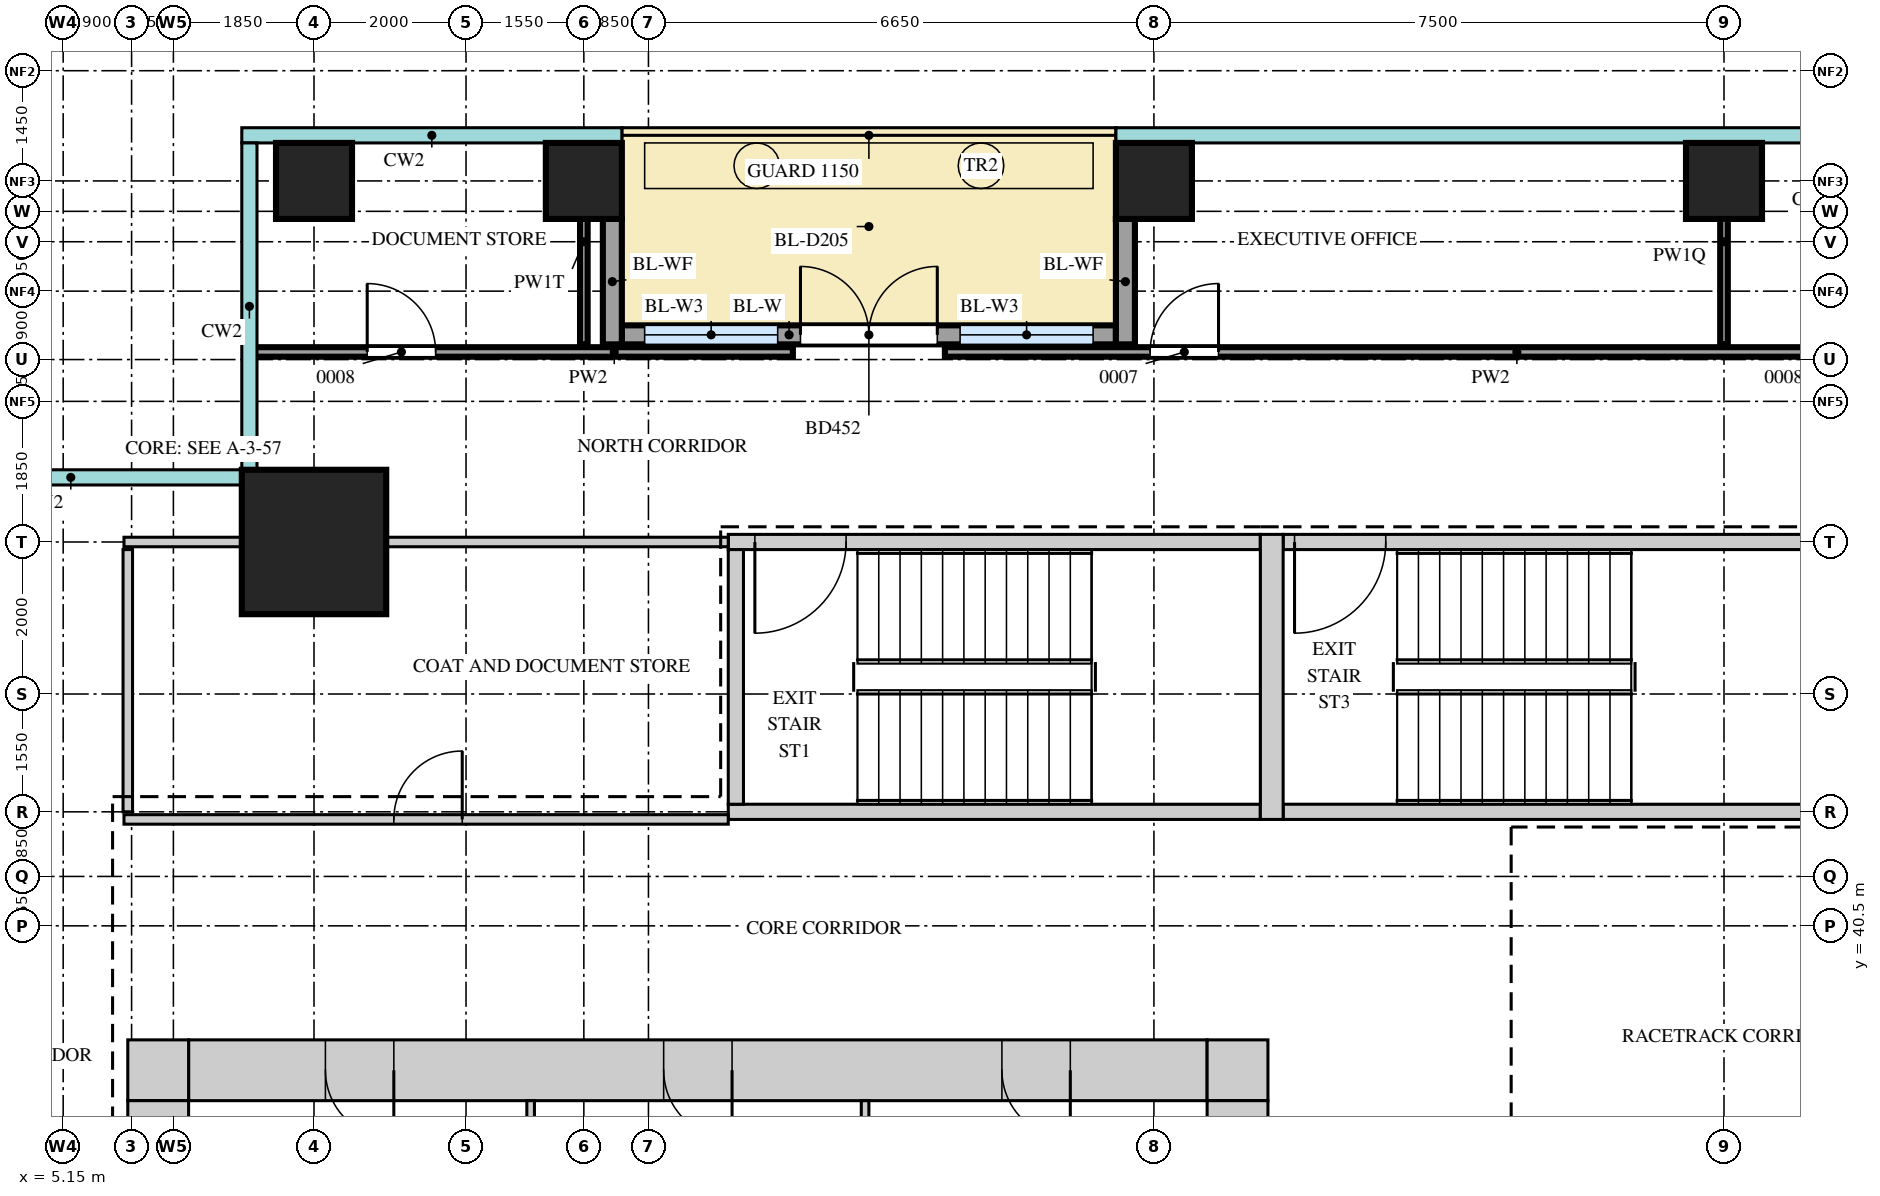
"""IFC4 building model, lengths in metres.
Left out: names, types, materials, properties, quantities, classifications, styles, units other than length and angle.
Written with IfcOpenShell. Run it as: python <this file> out.ifc"""

import sys

from ifc_helpers import new_model, si_unit, direction, frame, frame_2d, origin, origin_2d, place, context, subcontext, project, spatial, rectangle, extrude, source, transform, mapped, element, fill, save


model = new_model("IFC4")
c1 = context("Model", 3, precision=1e-05, world=origin(), true_north=direction((0.0, 1.0)))
c2 = subcontext(c1, "Body", "Model", "MODEL_VIEW")
j1 = project(units=[si_unit("LENGTHUNIT", "METRE"), si_unit("PLANEANGLEUNIT", "RADIAN")], contexts=[c1])
p1 = place(None, origin())
s1 = spatial("IfcSite", under=j1, at=p1, CompositionType="ELEMENT")
p2 = place(p1, origin())
s2 = spatial("IfcBuilding", under=s1, at=p2, CompositionType="ELEMENT")
p3 = place(p2, frame((0.0, 0.0, 204.7)))
s3 = spatial("IfcBuildingStorey", under=s2, at=p3, CompositionType="ELEMENT", Elevation=204.7)
m1 = source(origin(), c2, "Body", "SweptSolid", [
    extrude(rectangle(XDim=13.4, YDim=0.8, at=frame_2d((6.7, 0.0))), origin(), (0.0, 0.0, 1.0), 3.75),
])
p4 = place(p3, frame((6.8, 38.6, 0.0), z_axis=(0.0, 0.0, 1.0), x_axis=(1.0, 0.0, 0.0)))
e1 = element("IfcWall", 1, at=p4, inside=s3, PredefinedType="SHEAR", context=c2, shape_type="MappedRepresentation", body=[
    mapped(m1, transform((0.0, 0.0, 0.0))),
])
m2 = source(origin(), c2, "Body", "SweptSolid", [
    extrude(rectangle(XDim=0.9, YDim=2.1, at=frame_2d((0.45, 1.05))), frame((0.0, 0.41, 0.0), z_axis=(0.0, -1.0, 0.0), x_axis=(1.0, 0.0, 0.0)), (0.0, 0.0, 1.0), 0.82),
])
p5 = place(p4, frame((1.8, 0.0, 0.0)))
e2 = element("IfcOpeningElement", 2, at=p5, cuts=e1, PredefinedType="OPENING", context=c2, shape_type="MappedRepresentation", body=[
    mapped(m2, transform((0.0, 0.0, 0.0))),
])
p6 = place(p4, frame((6.25, 0.0, 0.0)))
e3 = element("IfcOpeningElement", 3, at=p6, cuts=e1, PredefinedType="OPENING", context=c2, shape_type="MappedRepresentation", body=[
    mapped(m2, transform((0.0, 0.0, 0.0))),
])
p7 = place(p4, frame((10.7, 0.0, 0.0)))
e4 = element("IfcOpeningElement", 4, at=p7, cuts=e1, PredefinedType="OPENING", context=c2, shape_type="MappedRepresentation", body=[
    mapped(m2, transform((0.0, 0.0, 0.0))),
])
m3 = source(origin(), c2, "Body", "SweptSolid", [
    extrude(rectangle(XDim=0.8, YDim=0.8, at=frame_2d((0.4, 0.0))), origin(), (0.0, 0.0, 1.0), 3.75),
])
for number, where, z_axis, x_axis in (
    (5, (20.2, 38.6, 0.0), (0.0, 0.0, 1.0), (1.0, 0.0, 0.0)),
    (6, (6.0, 38.6, 0.0), (0.0, 0.0, 1.0), (1.0, 0.0, 0.0)),
):
    element("IfcWall", number, at=place(p3, frame(where, z_axis=z_axis, x_axis=x_axis)), inside=s3, PredefinedType="SHEAR", context=c2, shape_type="MappedRepresentation", body=[
        mapped(m3, transform((0.0, 0.0, 0.0))),
    ])
m4 = source(origin(), c2, "Body", "SweptSolid", [
    extrude(rectangle(XDim=22.4, YDim=0.8, at=frame_2d((11.2, 0.0))), origin(), (0.0, 0.0, 1.0), 3.75),
])
p8 = place(p3, frame((20.6, 15.8, 0.0), z_axis=(0.0, 0.0, 1.0), x_axis=(0.0, 1.0, 0.0)))
e7 = element("IfcWall", 7, at=p8, inside=s3, PredefinedType="SHEAR", context=c2, shape_type="MappedRepresentation", body=[
    mapped(m4, transform((0.0, 0.0, 0.0))),
])
m5 = source(origin(), c2, "Body", "SweptSolid", [
    extrude(rectangle(XDim=1.8, YDim=2.1, at=frame_2d((0.9, 1.05))), frame((0.0, 0.41, 0.0), z_axis=(0.0, -1.0, 0.0), x_axis=(1.0, 0.0, 0.0)), (0.0, 0.0, 1.0), 0.82),
])
p9 = place(p8, frame((10.7, 0.0, 0.0)))
e8 = element("IfcOpeningElement", 8, at=p9, cuts=e7, PredefinedType="OPENING", context=c2, shape_type="MappedRepresentation", body=[
    mapped(m5, transform((0.0, 0.0, 0.0))),
])
p10 = place(p8, frame((0.35, 0.0, 0.0)))
e9 = element("IfcOpeningElement", 9, at=p10, cuts=e7, PredefinedType="OPENING", context=c2, shape_type="MappedRepresentation", body=[
    mapped(m2, transform((0.0, 0.0, 0.0))),
])
p11 = place(p8, frame((2.8, 0.0, 0.0)))
e10 = element("IfcOpeningElement", 10, at=p11, cuts=e7, PredefinedType="OPENING", context=c2, shape_type="MappedRepresentation", body=[
    mapped(m2, transform((0.0, 0.0, 0.0))),
])
m6 = source(origin(), c2, "Body", "SweptSolid", [
    extrude(rectangle(XDim=1.0, YDim=2.1, at=frame_2d((0.5, 1.05))), frame((0.0, 0.41, 0.0), z_axis=(0.0, -1.0, 0.0), x_axis=(1.0, 0.0, 0.0)), (0.0, 0.0, 1.0), 0.82),
])
p12 = place(p8, frame((5.5, 0.0, 0.0)))
e11 = element("IfcOpeningElement", 11, at=p12, cuts=e7, PredefinedType="OPENING", context=c2, shape_type="MappedRepresentation", body=[
    mapped(m6, transform((0.0, 0.0, 0.0))),
])
p13 = place(p3, frame((6.4, 15.8, 0.0), z_axis=(0.0, 0.0, 1.0), x_axis=(0.0, 1.0, 0.0)))
e12 = element("IfcWall", 12, at=p13, inside=s3, PredefinedType="SHEAR", context=c2, shape_type="MappedRepresentation", body=[
    mapped(m4, transform((0.0, 0.0, 0.0))),
])
m7 = source(origin(), c2, "Body", "SweptSolid", [
    extrude(rectangle(XDim=7.0, YDim=0.2, at=frame_2d((3.5, 0.0))), origin(), (0.0, 0.0, 1.0), 3.75),
])
p14 = place(p3, frame((13.9, 45.55, 0.0), z_axis=(0.0, 0.0, 1.0), x_axis=(1.0, 0.0, 0.0)))
e13 = element("IfcWall", 13, at=p14, inside=s3, PredefinedType="SHEAR", context=c2, shape_type="MappedRepresentation", body=[
    mapped(m7, transform((0.0, 0.0, 0.0))),
])
m8 = source(origin(), c2, "Body", "SweptSolid", [
    extrude(rectangle(XDim=1.2, YDim=2.1, at=frame_2d((0.6, 1.05))), frame((0.0, 0.11, 0.0), z_axis=(0.0, -1.0, 0.0), x_axis=(1.0, 0.0, 0.0)), (0.0, 0.0, 1.0), 0.22),
])
p15 = place(p14, frame((0.35, 0.0, 0.0)))
e14 = element("IfcOpeningElement", 14, at=p15, cuts=e13, PredefinedType="OPENING", context=c2, shape_type="MappedRepresentation", body=[
    mapped(m8, transform((0.0, 0.0, 0.0))),
])
p16 = place(p3, frame((13.9, 42.0, 0.0), z_axis=(0.0, 0.0, 1.0), x_axis=(1.0, 0.0, 0.0)))
e15 = element("IfcWall", 15, at=p16, inside=s3, PredefinedType="SHEAR", context=c2, shape_type="MappedRepresentation", body=[
    mapped(m7, transform((0.0, 0.0, 0.0))),
])
m9 = source(origin(), c2, "Body", "SweptSolid", [
    extrude(rectangle(XDim=7.1, YDim=0.2, at=frame_2d((3.55, 0.0))), origin(), (0.0, 0.0, 1.0), 3.75),
])
p17 = place(p3, frame((21.2, 45.55, 0.0), z_axis=(0.0, 0.0, 1.0), x_axis=(1.0, 0.0, 0.0)))
e16 = element("IfcWall", 16, at=p17, inside=s3, PredefinedType="SHEAR", context=c2, shape_type="MappedRepresentation", body=[
    mapped(m9, transform((0.0, 0.0, 0.0))),
])
p18 = place(p17, frame((0.15, 0.0, 0.0)))
e17 = element("IfcOpeningElement", 17, at=p18, cuts=e16, PredefinedType="OPENING", context=c2, shape_type="MappedRepresentation", body=[
    mapped(m8, transform((0.0, 0.0, 0.0))),
])
p19 = place(p3, frame((21.2, 42.0, 0.0), z_axis=(0.0, 0.0, 1.0), x_axis=(1.0, 0.0, 0.0)))
e18 = element("IfcWall", 18, at=p19, inside=s3, PredefinedType="SHEAR", context=c2, shape_type="MappedRepresentation", body=[
    mapped(m9, transform((0.0, 0.0, 0.0))),
])
m10 = source(origin(), c2, "Body", "SweptSolid", [
    extrude(rectangle(XDim=3.75, YDim=0.3, at=frame_2d((1.875, 0.0))), origin(), (0.0, 0.0, 1.0), 3.75),
])
p20 = place(p3, frame((21.05, 41.9, 0.0), z_axis=(0.0, 0.0, 1.0), x_axis=(0.0, 1.0, 0.0)))
e19 = element("IfcWall", 19, at=p20, inside=s3, PredefinedType="SHEAR", context=c2, shape_type="MappedRepresentation", body=[
    mapped(m10, transform((0.0, 0.0, 0.0))),
])
m11 = source(origin(), c2, "Body", "SweptSolid", [
    extrude(rectangle(XDim=3.35, YDim=0.2, at=frame_2d((1.675, 0.0))), origin(), (0.0, 0.0, 1.0), 3.75),
])
p21 = place(p3, frame((14.0, 42.1, 0.0), z_axis=(0.0, 0.0, 1.0), x_axis=(0.0, 1.0, 0.0)))
e20 = element("IfcWall", 20, at=p21, inside=s3, PredefinedType="SHEAR", context=c2, shape_type="MappedRepresentation", body=[
    mapped(m11, transform((0.0, 0.0, 0.0))),
])
m12 = source(origin(), c2, "Body", "SweptSolid", [
    extrude(rectangle(XDim=1.9, YDim=1.9, at=origin_2d()), origin(), (0.0, 0.0, 1.0), 4.0),
])
p22 = place(p3, frame((8.45, 45.55, 0.0), z_axis=(0.0, 0.0, 1.0), x_axis=(1.0, 0.0, 0.0)))
e21 = element("IfcColumn", 21, at=p22, inside=s3, PredefinedType="COLUMN", context=c2, shape_type="MappedRepresentation", body=[
    mapped(m12, transform((0.0, 0.0, 0.0))),
])
m13 = source(origin(), c2, "Body", "SweptSolid", [
    extrude(rectangle(XDim=1.0, YDim=1.0, at=origin_2d()), origin(), (0.0, 0.0, 1.0), 3.75),
])
for number, where, z_axis, x_axis in (
    (22, (8.45, 50.3, 0.0), (0.0, 0.0, 1.0), (1.0, 0.0, 0.0)),
    (23, (12.0, 50.3, 0.0), (0.0, 0.0, 1.0), (1.0, 0.0, 0.0)),
    (24, (19.5, 50.3, 0.0), (0.0, 0.0, 1.0), (1.0, 0.0, 0.0)),
    (25, (27.0, 50.3, 0.0), (0.0, 0.0, 1.0), (1.0, 0.0, 0.0)),
):
    element("IfcColumn", number, at=place(p3, frame(where, z_axis=z_axis, x_axis=x_axis)), inside=s3, PredefinedType="COLUMN", context=c2, shape_type="MappedRepresentation", body=[
        mapped(m13, transform((0.0, 0.0, 0.0))),
    ])
m14 = source(origin(), c2, "Body", "SweptSolid", [
    extrude(rectangle(XDim=6.5, YDim=0.25, at=frame_2d((3.25, 0.0))), origin(), (0.0, 0.0, 1.0), 3.75),
])
p23 = place(p3, frame((12.5, 48.275, 0.0), z_axis=(0.0, 0.0, 1.0), x_axis=(1.0, 0.0, 0.0)))
e26 = element("IfcWall", 26, at=p23, inside=s3, PredefinedType="SOLIDWALL", context=c2, shape_type="MappedRepresentation", body=[
    mapped(m14, transform((0.0, 0.0, 0.0))),
])
m15 = source(origin(), c2, "Body", "SweptSolid", [
    extrude(rectangle(XDim=1.75, YDim=2.4, at=frame_2d((0.875, 1.2))), frame((0.0, 0.135, 0.0), z_axis=(0.0, -1.0, 0.0), x_axis=(1.0, 0.0, 0.0)), (0.0, 0.0, 1.0), 0.27),
])
p24 = place(p23, frame((0.3, 0.0, 0.0)))
e27 = element("IfcOpeningElement", 27, at=p24, cuts=e26, PredefinedType="OPENING", context=c2, shape_type="MappedRepresentation", body=[
    mapped(m15, transform((0.0, 0.0, 0.0))),
])
p25 = place(p23, frame((4.45, 0.0, 0.0)))
e28 = element("IfcOpeningElement", 28, at=p25, cuts=e26, PredefinedType="OPENING", context=c2, shape_type="MappedRepresentation", body=[
    mapped(m15, transform((0.0, 0.0, 0.0))),
])
m16 = source(origin(), c2, "Body", "SweptSolid", [
    extrude(rectangle(XDim=1.8, YDim=2.4, at=frame_2d((0.9, 1.2))), frame((0.0, 0.135, 0.0), z_axis=(0.0, -1.0, 0.0), x_axis=(1.0, 0.0, 0.0)), (0.0, 0.0, 1.0), 0.27),
])
p26 = place(p23, frame((2.35, 0.0, 0.0)))
e29 = element("IfcOpeningElement", 29, at=p26, cuts=e26, PredefinedType="OPENING", context=c2, shape_type="MappedRepresentation", body=[
    mapped(m16, transform((0.0, 0.0, 0.0))),
])
m17 = source(origin(), c2, "Body", "SweptSolid", [
    extrude(rectangle(XDim=1.65, YDim=0.25, at=frame_2d((0.825, 0.0))), origin(), (0.0, 0.0, 1.0), 3.45),
])
for number, where, z_axis, x_axis in (
    (30, (12.375, 49.8, 0.0), (0.0, 0.0, 1.0), (0.0, -1.0, 0.0)),
    (31, (19.125, 49.8, 0.0), (0.0, 0.0, 1.0), (0.0, -1.0, 0.0)),
):
    element("IfcWall", number, at=place(p3, frame(where, z_axis=z_axis, x_axis=x_axis)), inside=s3, PredefinedType="SOLIDWALL", context=c2, shape_type="MappedRepresentation", body=[
        mapped(m17, transform((0.0, 0.0, 0.0))),
    ])
m18 = source(origin(), c2, "Body", "SweptSolid", [
    extrude(rectangle(XDim=6.0, YDim=0.1, at=frame_2d((3.0, 0.0))), origin(), (0.0, 0.0, 1.0), 3.8),
])
for number, where, z_axis, x_axis in (
    (32, (11.3, 32.2, 0.0), (0.0, 0.0, 1.0), (0.0, 1.0, 0.0)),
    (33, (15.7, 32.2, 0.0), (0.0, 0.0, 1.0), (0.0, 1.0, 0.0)),
):
    element("IfcWall", number, at=place(p3, frame(where, z_axis=z_axis, x_axis=x_axis)), inside=s3, PredefinedType="PARTITIONING", context=c2, shape_type="MappedRepresentation", body=[
        mapped(m18, transform((0.0, 0.0, 0.0))),
    ])
m19 = source(origin(), c2, "Body", "SweptSolid", [
    extrude(rectangle(XDim=7.95, YDim=0.125, at=frame_2d((3.975, 0.0))), origin(), (0.0, 0.0, 1.0), 3.8),
])
p27 = place(p3, frame((5.95, 41.9, 0.0), z_axis=(0.0, 0.0, 1.0), x_axis=(1.0, 0.0, 0.0)))
e34 = element("IfcWall", 34, at=p27, inside=s3, PredefinedType="PARTITIONING", context=c2, shape_type="MappedRepresentation", body=[
    mapped(m19, transform((0.0, 0.0, 0.0))),
])
m20 = source(origin(), c2, "Body", "SweptSolid", [
    extrude(rectangle(XDim=0.9, YDim=2.1, at=frame_2d((0.45, 1.05))), frame((0.0, 0.073, 0.0), z_axis=(0.0, -1.0, 0.0), x_axis=(1.0, 0.0, 0.0)), (0.0, 0.0, 1.0), 0.145),
])
p28 = place(p27, frame((3.55, 0.0, 0.0)))
e35 = element("IfcOpeningElement", 35, at=p28, cuts=e34, PredefinedType="OPENING", context=c2, shape_type="MappedRepresentation", body=[
    mapped(m20, transform((0.0, 0.0, 0.0))),
])
m21 = source(origin(), c2, "Body", "SweptSolid", [
    extrude(rectangle(XDim=3.45, YDim=0.125, at=frame_2d((1.725, 0.0))), origin(), (0.0, 0.0, 1.0), 3.8),
])
p29 = place(p3, frame((6.0, 42.0, 0.0), z_axis=(0.0, 0.0, 1.0), x_axis=(0.0, 1.0, 0.0)))
e36 = element("IfcWall", 36, at=p29, inside=s3, PredefinedType="PARTITIONING", context=c2, shape_type="MappedRepresentation", body=[
    mapped(m21, transform((0.0, 0.0, 0.0))),
])
m22 = source(origin(), c2, "Body", "SweptSolid", [
    extrude(rectangle(XDim=7.95, YDim=0.125, at=frame_2d((3.975, 0.0))), origin(), (0.0, 0.0, 1.0), 3.25),
])
p30 = place(p3, frame((5.95, 45.55, 0.0), z_axis=(0.0, 0.0, 1.0), x_axis=(1.0, 0.0, 0.0)))
e37 = element("IfcWall", 37, at=p30, inside=s3, PredefinedType="PARTITIONING", context=c2, shape_type="MappedRepresentation", body=[
    mapped(m22, transform((0.0, 0.0, 0.0))),
])
m23 = source(origin(), c2, "Body", "SweptSolid", [
    extrude(rectangle(XDim=2.7, YDim=0.1, at=frame_2d((1.35, 0.0))), origin(), (0.0, 0.0, 1.0), 3.3),
])
p31 = place(p3, frame((12.0, 48.15, 0.0), z_axis=(0.0, 0.0, 1.0), x_axis=(0.0, 1.0, 0.0)))
e38 = element("IfcWall", 38, at=p31, inside=s3, PredefinedType="PARTITIONING", context=c2, shape_type="MappedRepresentation", body=[
    mapped(m23, transform((0.0, 0.0, 0.0))),
])
m24 = source(origin(), c2, "Body", "SweptSolid", [
    extrude(rectangle(XDim=2.7, YDim=0.1, at=frame_2d((1.35, 0.0))), origin(), (0.0, 0.0, 1.0), 3.42),
])
p32 = place(p3, frame((27.0, 48.15, 0.0), z_axis=(0.0, 0.0, 1.0), x_axis=(0.0, 1.0, 0.0)))
e39 = element("IfcWall", 39, at=p32, inside=s3, PredefinedType="PARTITIONING", context=c2, shape_type="MappedRepresentation", body=[
    mapped(m24, transform((0.0, 0.0, 0.0))),
])
m25 = source(origin(), c2, "Body", "SweptSolid", [
    extrude(rectangle(XDim=7.1, YDim=0.125, at=frame_2d((3.55, 0.0))), origin(), (0.0, 0.0, 1.0), 3.8),
])
p33 = place(p3, frame((7.65, 48.05, 0.0), z_axis=(0.0, 0.0, 1.0), x_axis=(1.0, 0.0, 0.0)))
e40 = element("IfcWall", 40, at=p33, inside=s3, PredefinedType="PARTITIONING", context=c2, shape_type="MappedRepresentation", body=[
    mapped(m25, transform((0.0, 0.0, 0.0))),
])
p34 = place(p33, frame((1.5, 0.0, 0.0)))
e41 = element("IfcOpeningElement", 41, at=p34, cuts=e40, PredefinedType="OPENING", context=c2, shape_type="MappedRepresentation", body=[
    mapped(m20, transform((0.0, 0.0, 0.0))),
])
m26 = source(origin(), c2, "Body", "SweptSolid", [
    extrude(rectangle(XDim=13.9, YDim=0.125, at=frame_2d((6.95, 0.0))), origin(), (0.0, 0.0, 1.0), 3.8),
])
p35 = place(p3, frame((16.75, 48.05, 0.0), z_axis=(0.0, 0.0, 1.0), x_axis=(1.0, 0.0, 0.0)))
e42 = element("IfcWall", 42, at=p35, inside=s3, PredefinedType="PARTITIONING", context=c2, shape_type="MappedRepresentation", body=[
    mapped(m26, transform((0.0, 0.0, 0.0))),
])
p36 = place(p35, frame((2.7, 0.0, 0.0)))
e43 = element("IfcOpeningElement", 43, at=p36, cuts=e42, PredefinedType="OPENING", context=c2, shape_type="MappedRepresentation", body=[
    mapped(m20, transform((0.0, 0.0, 0.0))),
])
p37 = place(p35, frame((11.45, 0.0, 0.0)))
e44 = element("IfcOpeningElement", 44, at=p37, cuts=e42, PredefinedType="OPENING", context=c2, shape_type="MappedRepresentation", body=[
    mapped(m20, transform((0.0, 0.0, 0.0))),
])
m27 = source(origin(), c2, "Body", "SweptSolid", [
    extrude(rectangle(XDim=1.75, YDim=2.4, at=frame_2d((0.875, 1.2))), frame((0.0, 0.03, 0.0), z_axis=(0.0, -1.0, 0.0), x_axis=(1.0, 0.0, 0.0)), (0.0, 0.0, 1.0), 0.06),
])
p38 = place(p24, origin())
e45 = element("IfcWindow", 45, at=p38, inside=s3, PartitioningType="SINGLE_PANEL", PredefinedType="WINDOW", context=c2, shape_type="MappedRepresentation", body=[
    mapped(m27, transform((0.0, 0.0, 0.0))),
])
fill(e27, e45)
p39 = place(p25, origin())
e46 = element("IfcWindow", 46, at=p39, inside=s3, PartitioningType="SINGLE_PANEL", PredefinedType="WINDOW", context=c2, shape_type="MappedRepresentation", body=[
    mapped(m27, transform((0.0, 0.0, 0.0))),
])
fill(e28, e46)
m28 = source(origin(), c2, "Body", "SweptSolid", [
    extrude(rectangle(XDim=1.8, YDim=2.4, at=frame_2d((0.9, 1.2))), frame((0.0, 0.025, 0.0), z_axis=(0.0, -1.0, 0.0), x_axis=(1.0, 0.0, 0.0)), (0.0, 0.0, 1.0), 0.05),
])
p40 = place(p26, origin())
e47 = element("IfcDoor", 47, at=p40, inside=s3, OperationType="DOUBLE_DOOR_DOUBLE_SWING", PredefinedType="DOOR", context=c2, shape_type="MappedRepresentation", body=[
    mapped(m28, transform((0.0, 0.0, 0.0))),
])
fill(e29, e47)
m29 = source(origin(), c2, "Body", "SweptSolid", [
    extrude(rectangle(XDim=0.9, YDim=2.1, at=frame_2d((0.45, 1.05))), frame((0.0, 0.35, 0.0), z_axis=(0.0, -1.0, 0.0), x_axis=(1.0, 0.0, 0.0)), (0.0, 0.0, 1.0), 0.7),
])
p41 = place(p5, origin())
e48 = element("IfcDoor", 48, at=p41, inside=s3, OperationType="SINGLE_SWING_RIGHT", PredefinedType="DOOR", context=c2, shape_type="MappedRepresentation", body=[
    mapped(m29, transform((0.0, 0.0, 0.0))),
])
fill(e2, e48)
p42 = place(p6, origin())
e49 = element("IfcDoor", 49, at=p42, inside=s3, OperationType="SINGLE_SWING_RIGHT", PredefinedType="DOOR", context=c2, shape_type="MappedRepresentation", body=[
    mapped(m29, transform((0.0, 0.0, 0.0))),
])
fill(e3, e49)
p43 = place(p7, origin())
e50 = element("IfcDoor", 50, at=p43, inside=s3, OperationType="SINGLE_SWING_RIGHT", PredefinedType="DOOR", context=c2, shape_type="MappedRepresentation", body=[
    mapped(m29, transform((0.0, 0.0, 0.0))),
])
fill(e4, e50)
m30 = source(origin(), c2, "Body", "SweptSolid", [
    extrude(rectangle(XDim=0.9, YDim=2.1, at=frame_2d((0.45, 1.05))), frame((0.0, 0.025, 0.0), z_axis=(0.0, -1.0, 0.0), x_axis=(1.0, 0.0, 0.0)), (0.0, 0.0, 1.0), 0.05),
])
p44 = place(p28, origin())
e51 = element("IfcDoor", 51, at=p44, inside=s3, OperationType="SINGLE_SWING_LEFT", PredefinedType="DOOR", context=c2, shape_type="MappedRepresentation", body=[
    mapped(m30, transform((0.0, 0.0, 0.0))),
])
fill(e35, e51)
p45 = place(p34, origin())
e52 = element("IfcDoor", 52, at=p45, inside=s3, OperationType="SINGLE_SWING_RIGHT", PredefinedType="DOOR", context=c2, shape_type="MappedRepresentation", body=[
    mapped(m30, transform((0.0, 0.0, 0.0))),
])
fill(e41, e52)
p46 = place(p36, origin())
e53 = element("IfcDoor", 53, at=p46, inside=s3, OperationType="SINGLE_SWING_LEFT", PredefinedType="DOOR", context=c2, shape_type="MappedRepresentation", body=[
    mapped(m30, transform((0.0, 0.0, 0.0))),
])
fill(e43, e53)
m31 = source(origin(), c2, "Body", "SweptSolid", [
    extrude(rectangle(XDim=1.2, YDim=2.1, at=frame_2d((0.6, 1.05))), frame((0.0, 0.025, 0.0), z_axis=(0.0, -1.0, 0.0), x_axis=(1.0, 0.0, 0.0)), (0.0, 0.0, 1.0), 0.05),
])
p47 = place(p15, origin())
e54 = element("IfcDoor", 54, at=p47, inside=s3, OperationType="SINGLE_SWING_LEFT", PredefinedType="DOOR", context=c2, shape_type="MappedRepresentation", body=[
    mapped(m31, transform((0.0, 0.0, 0.0))),
])
fill(e14, e54)
p48 = place(p18, origin())
e55 = element("IfcDoor", 55, at=p48, inside=s3, OperationType="SINGLE_SWING_LEFT", PredefinedType="DOOR", context=c2, shape_type="MappedRepresentation", body=[
    mapped(m31, transform((0.0, 0.0, 0.0))),
])
fill(e17, e55)
save(model, sys.argv[1])
